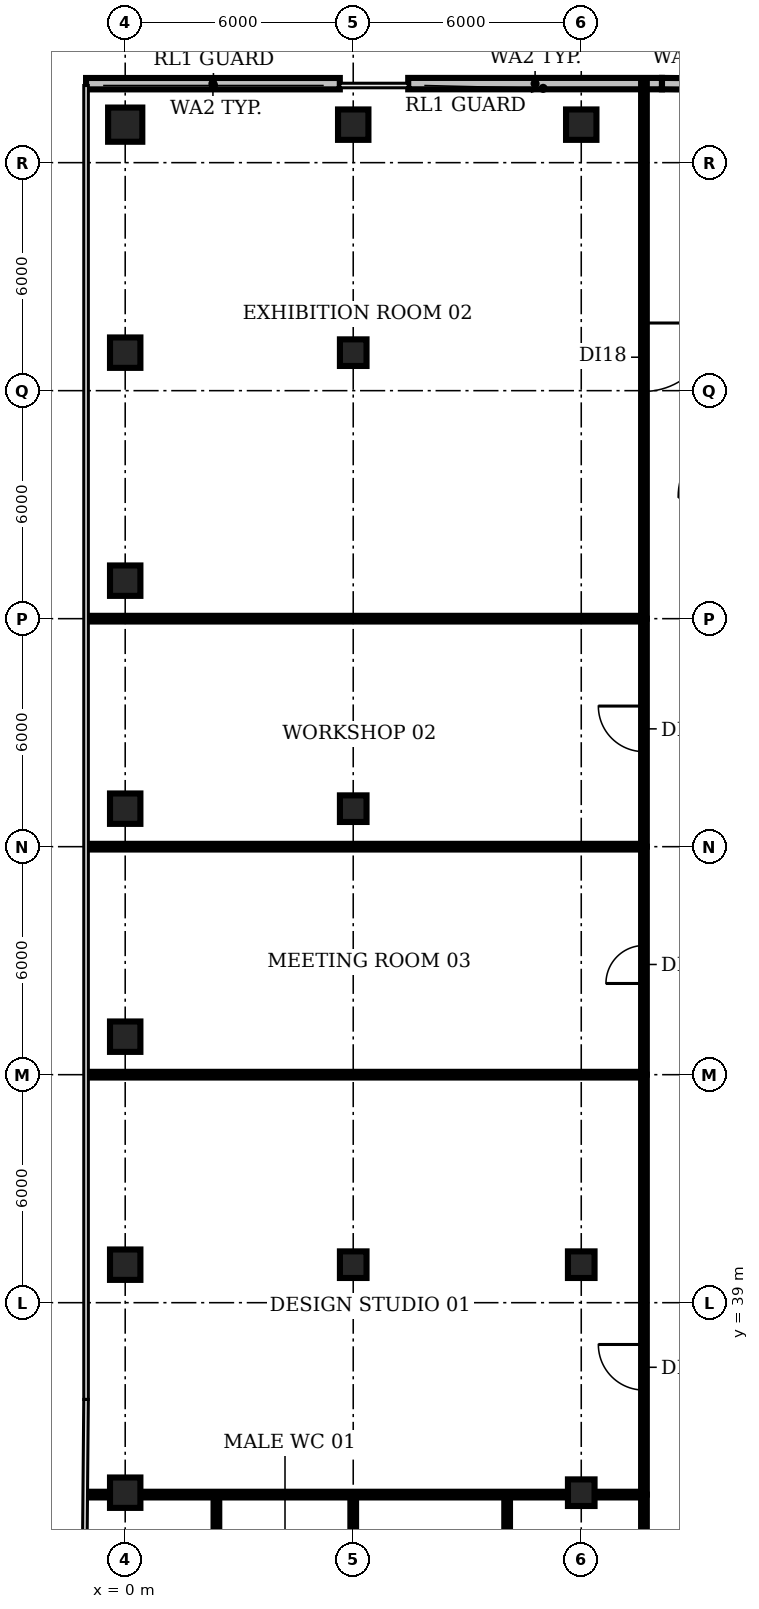
"""IFC4 building model, lengths in metres.
Left out: names, types, materials, properties, quantities, classifications, styles, units other than length and angle.
Written with IfcOpenShell. Run it as: python <this file> out.ifc"""

import sys

from ifc_helpers import new_model, si_unit, direction, frame, frame_2d, origin, origin_2d, place, context, subcontext, project, spatial, rectangle, circle, extrude, element, fill, save


model = new_model("IFC4")
c1 = context("Model", 3, precision=1e-05, world=origin(), true_north=direction((0.0, 1.0)))
c2 = subcontext(c1, "Body", "Model", "MODEL_VIEW")
j1 = project(units=[si_unit("LENGTHUNIT", "METRE"), si_unit("PLANEANGLEUNIT", "RADIAN")], contexts=[c1])
p1 = place(None, origin())
s1 = spatial("IfcSite", under=j1, at=p1, CompositionType="ELEMENT")
p2 = place(p1, origin())
s2 = spatial("IfcBuilding", under=s1, at=p2, CompositionType="ELEMENT")
p3 = place(p2, frame((0.0, 0.0, 230.6)))
s3 = spatial("IfcBuildingStorey", under=s2, at=p3, CompositionType="ELEMENT", Elevation=230.6)
for number, where, z_axis, x_axis in (
    (1, (0.0, 34.0, 0.0), (0.0, 0.0, 1.0), (1.0, 0.0, 0.0)),
    (2, (0.0, 40.0, 0.0), (0.0, 0.0, 1.0), (1.0, 0.0, 0.0)),
    (3, (0.0, 46.0, 0.0), (0.0, 0.0, 1.0), (1.0, 0.0, 0.0)),
    (4, (0.0, 52.0, 0.0), (0.0, 0.0, 1.0), (1.0, 0.0, 0.0)),
    (5, (0.0, 58.0, 0.0), (0.0, 0.0, 1.0), (1.0, 0.0, 0.0)),
    (6, (0.0, 64.0, 0.0), (0.0, 0.0, 1.0), (1.0, 0.0, 0.0)),
):
    element("IfcColumn", number, at=place(p3, frame(where, z_axis=z_axis, x_axis=x_axis)), inside=s3, PredefinedType="COLUMN", context=c2, shape_type="SweptSolid", body=[
        extrude(rectangle(XDim=0.8, YDim=0.8, at=origin_2d()), origin(), (0.0, 0.0, 1.0), 3.85),
    ])
p4 = place(p3, frame((0.0, 70.0, 0.0), z_axis=(0.0, 0.0, 1.0), x_axis=(1.0, 0.0, 0.0)))
e7 = element("IfcColumn", 7, at=p4, inside=s3, PredefinedType="COLUMN", context=c2, shape_type="SweptSolid", body=[
    extrude(circle(Radius=0.45, at=origin_2d()), origin(), (0.0, 0.0, 1.0), 3.85),
])
for number, where, z_axis, x_axis in (
    (8, (6.0, 40.0, 0.0), (0.0, 0.0, 1.0), (1.0, 0.0, 0.0)),
    (9, (6.0, 52.0, 0.0), (0.0, 0.0, 1.0), (1.0, 0.0, 0.0)),
    (10, (6.0, 64.0, 0.0), (0.0, 0.0, 1.0), (1.0, 0.0, 0.0)),
):
    element("IfcColumn", number, at=place(p3, frame(where, z_axis=z_axis, x_axis=x_axis)), inside=s3, PredefinedType="COLUMN", context=c2, shape_type="SweptSolid", body=[
        extrude(rectangle(XDim=0.7, YDim=0.7, at=origin_2d()), origin(), (0.0, 0.0, 1.0), 3.85),
    ])
p5 = place(p3, frame((6.0, 70.0, 0.0), z_axis=(0.0, 0.0, 1.0), x_axis=(1.0, 0.0, 0.0)))
e11 = element("IfcColumn", 11, at=p5, inside=s3, PredefinedType="COLUMN", context=c2, shape_type="SweptSolid", body=[
    extrude(rectangle(XDim=0.8, YDim=0.8, at=origin_2d()), origin(), (0.0, 0.0, 1.0), 3.85),
])
for number, where, z_axis, x_axis in (
    (12, (12.0, 34.0, 0.0), (0.0, 0.0, 1.0), (1.0, 0.0, 0.0)),
    (13, (12.0, 40.0, 0.0), (0.0, 0.0, 1.0), (1.0, 0.0, 0.0)),
):
    element("IfcColumn", number, at=place(p3, frame(where, z_axis=z_axis, x_axis=x_axis)), inside=s3, PredefinedType="COLUMN", context=c2, shape_type="SweptSolid", body=[
        extrude(rectangle(XDim=0.7, YDim=0.7, at=origin_2d()), origin(), (0.0, 0.0, 1.0), 3.85),
    ])
p6 = place(p3, frame((12.0, 70.0, 0.0), z_axis=(0.0, 0.0, 1.0), x_axis=(1.0, 0.0, 0.0)))
e14 = element("IfcColumn", 14, at=p6, inside=s3, PredefinedType="COLUMN", context=c2, shape_type="SweptSolid", body=[
    extrude(rectangle(XDim=0.8, YDim=0.8, at=origin_2d()), origin(), (0.0, 0.0, 1.0), 3.85),
])
for number, where, z_axis, x_axis in (
    (15, (14.124, 71.08, 0.0), (0.0, 0.0, 1.0), (-1.0, 0.0, 0.0)),
    (16, (5.647, 71.078, 0.0), (0.0, 0.0, 1.0), (-1.0, 0.0, 0.0)),
):
    element("IfcWall", number, at=place(p3, frame(where, z_axis=z_axis, x_axis=x_axis)), inside=s3, PredefinedType="SOLIDWALL", context=c2, shape_type="SweptSolid", body=[
        extrude(rectangle(XDim=6.677, YDim=0.3, at=frame_2d((3.339, 0.0))), origin(), (0.0, 0.0, 1.0), 3.85),
    ])
p7 = place(p3, frame((16.027, 71.063, 0.0), z_axis=(0.0, 0.0, 1.0), x_axis=(-0.999961913014, 0.008727687086, 0.0)))
e17 = element("IfcWall", 17, at=p7, inside=s3, PredefinedType="SOLIDWALL", context=c2, shape_type="SweptSolid", body=[
    extrude(rectangle(XDim=1.902, YDim=0.3, at=frame_2d((0.951, 0.0))), origin(), (0.0, 0.0, 1.0), 3.85),
])
p8 = place(p3, frame((-1.0, 33.95, 0.0), z_axis=(0.0, 0.0, 1.0), x_axis=(1.0, 0.0, 0.0)))
e18 = element("IfcWall", 18, at=p8, inside=s3, PredefinedType="PARTITIONING", context=c2, shape_type="SweptSolid", body=[
    extrude(rectangle(XDim=14.65, YDim=0.15, at=frame_2d((7.325, 0.0))), origin(), (0.0, 0.0, 1.0), 2.88),
])
for number, where, z_axis, x_axis in (
    (19, (-0.98, 45.0, 0.0), (0.0, 0.0, 1.0), (1.0, 0.0, 0.0)),
    (20, (-0.98, 51.0, 0.0), (0.0, 0.0, 1.0), (1.0, 0.0, 0.0)),
    (21, (-0.98, 57.0, 0.0), (0.0, 0.0, 1.0), (1.0, 0.0, 0.0)),
):
    element("IfcWall", number, at=place(p3, frame(where, z_axis=z_axis, x_axis=x_axis)), inside=s3, PredefinedType="PARTITIONING", context=c2, shape_type="SweptSolid", body=[
        extrude(rectangle(XDim=14.63, YDim=0.15, at=frame_2d((7.315, 0.0))), origin(), (0.0, 0.0, 1.0), 2.88),
    ])
p9 = place(p3, frame((2.4, 27.95, 0.0), z_axis=(0.0, 0.0, 1.0), x_axis=(0.0, 1.0, 0.0)))
e22 = element("IfcWall", 22, at=p9, inside=s3, PredefinedType="PARTITIONING", context=c2, shape_type="SweptSolid", body=[
    extrude(rectangle(XDim=6.0, YDim=0.15, at=frame_2d((3.0, 0.0))), origin(), (0.0, 0.0, 1.0), 2.88),
])
p10 = place(p3, frame((6.0, 28.0, 0.0), z_axis=(0.0, 0.0, 1.0), x_axis=(0.0, 1.0, 0.0)))
e23 = element("IfcWall", 23, at=p10, inside=s3, PredefinedType="PARTITIONING", context=c2, shape_type="SweptSolid", body=[
    extrude(rectangle(XDim=5.95, YDim=0.15, at=frame_2d((2.975, 0.0))), origin(), (0.0, 0.0, 1.0), 2.88),
])
p11 = place(p3, frame((10.05, 29.15, 0.0), z_axis=(0.0, 0.0, 1.0), x_axis=(0.0, 1.0, 0.0)))
e24 = element("IfcWall", 24, at=p11, inside=s3, PredefinedType="PARTITIONING", context=c2, shape_type="SweptSolid", body=[
    extrude(rectangle(XDim=4.8, YDim=0.15, at=frame_2d((2.4, 0.0))), origin(), (0.0, 0.0, 1.0), 2.88),
])
p12 = place(p3, frame((13.65, 29.15, 0.0), z_axis=(0.0, 0.0, 1.0), x_axis=(0.0, 1.0, 0.0)))
e25 = element("IfcWall", 25, at=p12, inside=s3, PredefinedType="PARTITIONING", context=c2, shape_type="SweptSolid", body=[
    extrude(rectangle(XDim=4.8, YDim=0.15, at=frame_2d((2.4, 0.0))), origin(), (0.0, 0.0, 1.0), 2.88),
])
p13 = place(p12, frame((1.6, 0.0, 0.0)))
e26 = element("IfcOpeningElement", 26, at=p13, cuts=e25, PredefinedType="OPENING", context=c2, shape_type="SweptSolid", body=[
    extrude(rectangle(XDim=0.9, YDim=2.1, at=frame_2d((0.45, 1.05))), frame((0.0, 0.085, 0.0), z_axis=(0.0, -1.0, 0.0), x_axis=(1.0, 0.0, 0.0)), (0.0, 0.0, 1.0), 0.17),
])
p14 = place(p3, frame((13.65, 33.95, 0.0), z_axis=(0.0, 0.0, 1.0), x_axis=(0.0, 1.0, 0.0)))
e27 = element("IfcWall", 27, at=p14, inside=s3, PredefinedType="PARTITIONING", context=c2, shape_type="SweptSolid", body=[
    extrude(rectangle(XDim=11.05, YDim=0.15, at=frame_2d((5.525, 0.0))), origin(), (0.0, 0.0, 1.0), 2.88),
])
p15 = place(p14, frame((2.75, 0.0, 0.0)))
e28 = element("IfcOpeningElement", 28, at=p15, cuts=e27, PredefinedType="OPENING", context=c2, shape_type="SweptSolid", body=[
    extrude(rectangle(XDim=1.2, YDim=2.1, at=frame_2d((0.6, 1.05))), frame((0.0, 0.085, 0.0), z_axis=(0.0, -1.0, 0.0), x_axis=(1.0, 0.0, 0.0)), (0.0, 0.0, 1.0), 0.17),
])
p16 = place(p3, frame((13.65, 45.0, 0.0), z_axis=(0.0, 0.0, 1.0), x_axis=(0.0, 1.0, 0.0)))
e29 = element("IfcWall", 29, at=p16, inside=s3, PredefinedType="PARTITIONING", context=c2, shape_type="SweptSolid", body=[
    extrude(rectangle(XDim=6.0, YDim=0.15, at=frame_2d((3.0, 0.0))), origin(), (0.0, 0.0, 1.0), 2.88),
])
p17 = place(p16, frame((2.4, 0.0, 0.0)))
e30 = element("IfcOpeningElement", 30, at=p17, cuts=e29, PredefinedType="OPENING", context=c2, shape_type="SweptSolid", body=[
    extrude(rectangle(XDim=1.0, YDim=2.1, at=frame_2d((0.5, 1.05))), frame((0.0, 0.085, 0.0), z_axis=(0.0, -1.0, 0.0), x_axis=(1.0, 0.0, 0.0)), (0.0, 0.0, 1.0), 0.17),
])
p18 = place(p3, frame((13.65, 51.0, 0.0), z_axis=(0.0, 0.0, 1.0), x_axis=(0.0, 1.0, 0.0)))
e31 = element("IfcWall", 31, at=p18, inside=s3, PredefinedType="PARTITIONING", context=c2, shape_type="SweptSolid", body=[
    extrude(rectangle(XDim=6.0, YDim=0.15, at=frame_2d((3.0, 0.0))), origin(), (0.0, 0.0, 1.0), 2.88),
])
p19 = place(p18, frame((2.5, 0.0, 0.0)))
e32 = element("IfcOpeningElement", 32, at=p19, cuts=e31, PredefinedType="OPENING", context=c2, shape_type="SweptSolid", body=[
    extrude(rectangle(XDim=1.2, YDim=2.1, at=frame_2d((0.6, 1.05))), frame((0.0, 0.085, 0.0), z_axis=(0.0, -1.0, 0.0), x_axis=(1.0, 0.0, 0.0)), (0.0, 0.0, 1.0), 0.17),
])
p20 = place(p3, frame((13.65, 71.09, 0.0), z_axis=(0.0, 0.0, 1.0), x_axis=(0.0, -1.0, 0.0)))
e33 = element("IfcWall", 33, at=p20, inside=s3, PredefinedType="PARTITIONING", context=c2, shape_type="SweptSolid", body=[
    extrude(rectangle(XDim=14.09, YDim=0.15, at=frame_2d((7.045, 0.0))), origin(), (0.0, 0.0, 1.0), 2.88),
])
p21 = place(p20, frame((6.31, 0.0, 0.0)))
e34 = element("IfcOpeningElement", 34, at=p21, cuts=e33, PredefinedType="OPENING", context=c2, shape_type="SweptSolid", body=[
    extrude(rectangle(XDim=1.8, YDim=2.1, at=frame_2d((0.9, 1.05))), frame((0.0, 0.085, 0.0), z_axis=(0.0, -1.0, 0.0), x_axis=(1.0, 0.0, 0.0)), (0.0, 0.0, 1.0), 0.17),
])
p22 = place(p15, origin())
e35 = element("IfcDoor", 35, at=p22, inside=s3, OperationType="SINGLE_SWING_RIGHT", PredefinedType="DOOR", context=c2, shape_type="SweptSolid", body=[
    extrude(rectangle(XDim=1.2, YDim=2.1, at=frame_2d((0.6, 1.05))), frame((0.0, 0.025, 0.0), z_axis=(0.0, -1.0, 0.0), x_axis=(1.0, 0.0, 0.0)), (0.0, 0.0, 1.0), 0.05),
])
fill(e28, e35)
p23 = place(p17, origin())
e36 = element("IfcDoor", 36, at=p23, inside=s3, OperationType="SINGLE_SWING_LEFT", PredefinedType="DOOR", context=c2, shape_type="SweptSolid", body=[
    extrude(rectangle(XDim=1.0, YDim=2.1, at=frame_2d((0.5, 1.05))), frame((0.0, 0.025, 0.0), z_axis=(0.0, -1.0, 0.0), x_axis=(1.0, 0.0, 0.0)), (0.0, 0.0, 1.0), 0.05),
])
fill(e30, e36)
p24 = place(p19, origin())
e37 = element("IfcDoor", 37, at=p24, inside=s3, OperationType="SINGLE_SWING_RIGHT", PredefinedType="DOOR", context=c2, shape_type="SweptSolid", body=[
    extrude(rectangle(XDim=1.2, YDim=2.1, at=frame_2d((0.6, 1.05))), frame((0.0, 0.025, 0.0), z_axis=(0.0, -1.0, 0.0), x_axis=(1.0, 0.0, 0.0)), (0.0, 0.0, 1.0), 0.05),
])
fill(e32, e37)
p25 = place(p21, origin())
e38 = element("IfcDoor", 38, at=p25, inside=s3, OperationType="SINGLE_SWING_LEFT", PredefinedType="DOOR", context=c2, shape_type="SweptSolid", body=[
    extrude(rectangle(XDim=1.8, YDim=2.1, at=frame_2d((0.9, 1.05))), frame((0.0, 0.025, 0.0), z_axis=(0.0, -1.0, 0.0), x_axis=(1.0, 0.0, 0.0)), (0.0, 0.0, 1.0), 0.05),
])
fill(e34, e38)
save(model, sys.argv[1])
